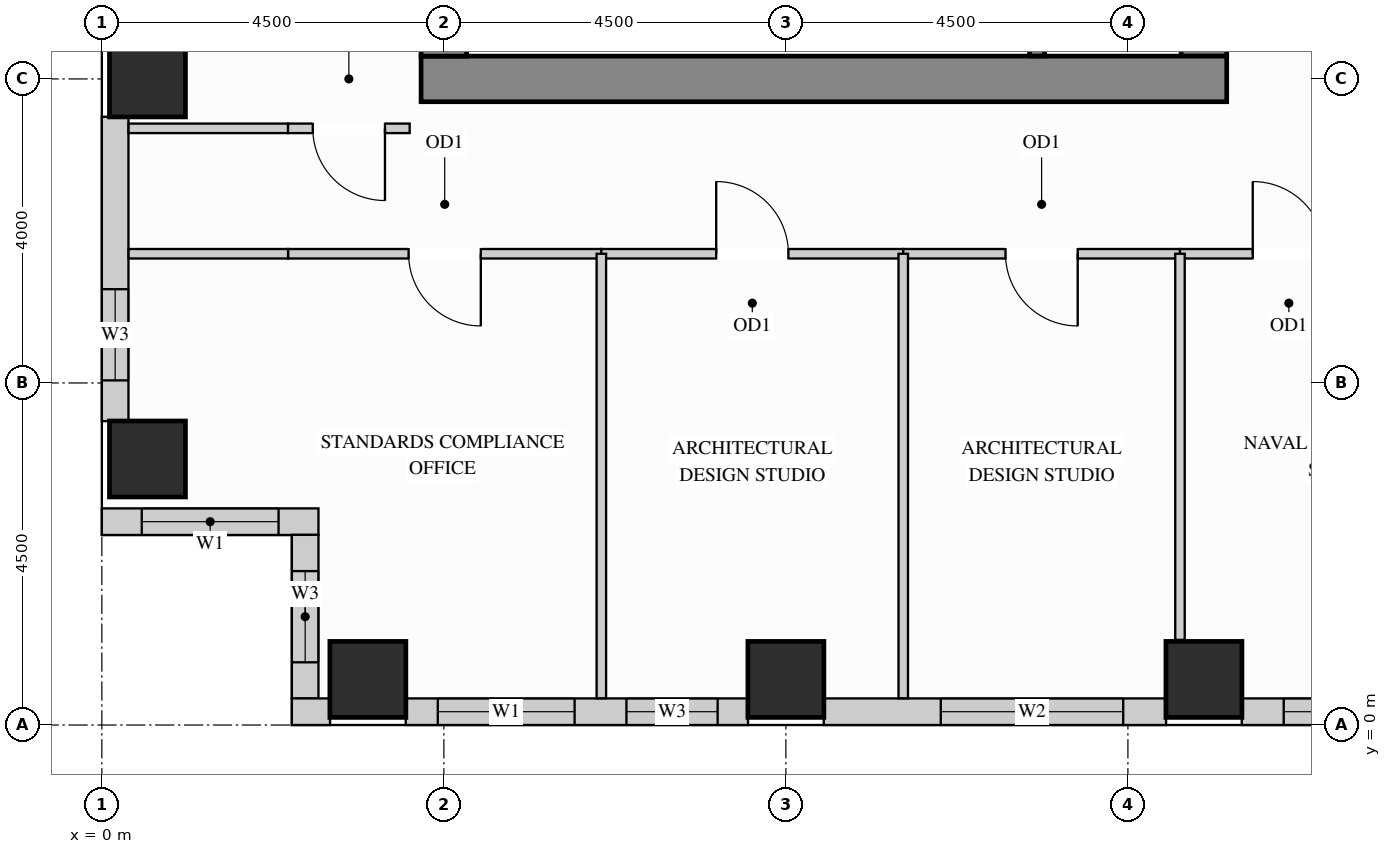
"""IFC4 building model, lengths in metres.
Left out: names, types, materials, properties, quantities, classifications, styles, units other than length and angle.
Written with IfcOpenShell. Run it as: python <this file> out.ifc"""

import sys

from ifc_helpers import new_model, si_unit, direction, frame, frame_2d, origin, origin_2d, place, context, subcontext, project, spatial, rectangle, extrude, source, transform, mapped, element, fill, save


model = new_model("IFC4")
c1 = context("Model", 3, precision=1e-05, world=origin(), true_north=direction((0.0, 1.0)))
c2 = subcontext(c1, "Body", "Model", "MODEL_VIEW")
j1 = project(units=[si_unit("LENGTHUNIT", "METRE"), si_unit("PLANEANGLEUNIT", "RADIAN")], contexts=[c1])
p1 = place(None, origin())
s1 = spatial("IfcSite", under=j1, at=p1, CompositionType="ELEMENT")
p2 = place(p1, origin())
s2 = spatial("IfcBuilding", under=s1, at=p2, CompositionType="ELEMENT")
p3 = place(p2, frame((0.0, 0.0, 150.3)))
s3 = spatial("IfcBuildingStorey", under=s2, at=p3, CompositionType="ELEMENT", Elevation=150.3)
m1 = source(origin(), c2, "Body", "SweptSolid", [
    extrude(rectangle(XDim=1.0, YDim=1.0, at=origin_2d()), origin(), (0.0, 0.0, 1.0), 3.4),
])
for number, where, z_axis, x_axis in (
    (1, (14.5, 0.6, 0.0), (0.0, 0.0, 1.0), (1.0, 0.0, 0.0)),
    (2, (3.5, 0.6, 0.0), (0.0, 0.0, 1.0), (1.0, 0.0, 0.0)),
    (3, (9.0, 0.6, 0.0), (0.0, 0.0, 1.0), (1.0, 0.0, 0.0)),
    (4, (0.6, 3.5, 0.0), (0.0, 0.0, 1.0), (1.0, 0.0, 0.0)),
    (5, (0.6, 8.5, 0.0), (0.0, 0.0, 1.0), (1.0, 0.0, 0.0)),
):
    element("IfcColumn", number, at=place(p3, frame(where, z_axis=z_axis, x_axis=x_axis)), inside=s3, PredefinedType="COLUMN", context=c2, shape_type="MappedRepresentation", body=[
        mapped(m1, transform((0.0, 0.0, 0.0), x_axis=(1.0, 0.0, 0.0), y_axis=(0.0, 1.0, 0.0), z_axis=(0.0, 0.0, 1.0))),
    ])
m2 = source(origin(), c2, "Body", "SweptSolid", [
    extrude(rectangle(XDim=10.02, YDim=0.6, at=frame_2d((5.01, 0.0))), origin(), (0.0, 0.0, 1.0), 3.4),
])
p4 = place(p3, frame((14.5, 8.8, 0.0), z_axis=(0.0, 0.0, 1.0), x_axis=(0.0, 1.0, 0.0)))
e6 = element("IfcWall", 6, at=p4, inside=s3, PredefinedType="SHEAR", context=c2, shape_type="MappedRepresentation", body=[
    mapped(m2, transform((0.0, 0.0, 0.0), x_axis=(1.0, 0.0, 0.0), y_axis=(0.0, 1.0, 0.0), z_axis=(0.0, 0.0, 1.0))),
])
m3 = source(origin(), c2, "Body", "SweptSolid", [
    extrude(rectangle(XDim=10.6, YDim=0.6, at=frame_2d((5.3, 0.0))), origin(), (0.0, 0.0, 1.0), 3.4),
])
p5 = place(p3, frame((4.2, 8.5, 0.0), z_axis=(0.0, 0.0, 1.0), x_axis=(1.0, 0.0, 0.0)))
e7 = element("IfcWall", 7, at=p5, inside=s3, PredefinedType="SHEAR", context=c2, shape_type="MappedRepresentation", body=[
    mapped(m3, transform((0.0, 0.0, 0.0), x_axis=(1.0, 0.0, 0.0), y_axis=(0.0, 1.0, 0.0), z_axis=(0.0, 0.0, 1.0))),
])
m4 = source(origin(), c2, "Body", "SweptSolid", [
    extrude(rectangle(XDim=20.4, YDim=0.6, at=frame_2d((10.2, 0.0))), origin(), (0.0, 0.0, 1.0), 3.4),
])
p6 = place(p3, frame((4.5, 8.8, 0.0), z_axis=(0.0, 0.0, 1.0), x_axis=(0.0, 1.0, 0.0)))
e8 = element("IfcWall", 8, at=p6, inside=s3, PredefinedType="SHEAR", context=c2, shape_type="MappedRepresentation", body=[
    mapped(m4, transform((0.0, 0.0, 0.0), x_axis=(1.0, 0.0, 0.0), y_axis=(0.0, 1.0, 0.0), z_axis=(0.0, 0.0, 1.0))),
])
p7 = place(p3, frame((0.175, 8.002, 0.0), z_axis=(0.0, 0.0, 1.0), x_axis=(0.0, -1.0, 0.0)))
e9 = element("IfcWall", 9, at=p7, inside=s3, PredefinedType="SOLIDWALL", context=c2, shape_type="SweptSolid", body=[
    extrude(rectangle(XDim=4.004, YDim=0.35, at=frame_2d((2.002, 0.0))), origin(), (0.0, 0.0, 1.0), 2.612),
])
p8 = place(p7, frame((2.268, 0.0, 0.78)))
e10 = element("IfcOpeningElement", 10, at=p8, cuts=e9, PredefinedType="OPENING", context=c2, shape_type="SweptSolid", body=[
    extrude(rectangle(XDim=1.2, YDim=1.652, at=frame_2d((0.6, 0.826))), frame((0.0, 0.185, 0.0), z_axis=(0.0, -1.0, 0.0), x_axis=(1.0, 0.0, 0.0)), (0.0, 0.0, 1.0), 0.37),
])
p9 = place(p3, frame((0.0, 2.675, 0.0), z_axis=(0.0, 0.0, 1.0), x_axis=(1.0, 0.0, 0.0)))
e11 = element("IfcWall", 11, at=p9, inside=s3, PredefinedType="SOLIDWALL", context=c2, shape_type="SweptSolid", body=[
    extrude(rectangle(XDim=2.85, YDim=0.35, at=frame_2d((1.425, 0.0))), origin(), (0.0, 0.0, 1.0), 3.385),
])
p10 = place(p9, frame((0.525, 0.0, 0.78)))
e12 = element("IfcOpeningElement", 12, at=p10, cuts=e11, PredefinedType="OPENING", context=c2, shape_type="SweptSolid", body=[
    extrude(rectangle(XDim=1.8, YDim=2.1, at=frame_2d((0.9, 1.05))), frame((0.0, 0.185, 0.0), z_axis=(0.0, -1.0, 0.0), x_axis=(1.0, 0.0, 0.0)), (0.0, 0.0, 1.0), 0.37),
])
p11 = place(p3, frame((2.675, 2.502, 0.0), z_axis=(0.0, 0.0, 1.0), x_axis=(0.0, -1.0, 0.0)))
e13 = element("IfcWall", 13, at=p11, inside=s3, PredefinedType="SOLIDWALL", context=c2, shape_type="SweptSolid", body=[
    extrude(rectangle(XDim=2.154, YDim=0.35, at=frame_2d((1.077, 0.0))), origin(), (0.0, 0.0, 1.0), 3.385),
])
p12 = place(p11, frame((0.477, 0.0, 0.78)))
e14 = element("IfcOpeningElement", 14, at=p12, cuts=e13, PredefinedType="OPENING", context=c2, shape_type="SweptSolid", body=[
    extrude(rectangle(XDim=1.2, YDim=2.1, at=frame_2d((0.6, 1.05))), frame((0.0, 0.185, 0.0), z_axis=(0.0, -1.0, 0.0), x_axis=(1.0, 0.0, 0.0)), (0.0, 0.0, 1.0), 0.37),
])
m5 = source(origin(), c2, "Body", "SweptSolid", [
    extrude(rectangle(XDim=0.502, YDim=0.35, at=frame_2d((0.251, 0.0))), origin(), (0.0, 0.0, 1.0), 3.385),
])
p13 = place(p3, frame((2.5, 0.175, 0.0), z_axis=(0.0, 0.0, 1.0), x_axis=(1.0, 0.0, 0.0)))
e15 = element("IfcWall", 15, at=p13, inside=s3, PredefinedType="SOLIDWALL", context=c2, shape_type="MappedRepresentation", body=[
    mapped(m5, transform((0.0, 0.0, 0.0), x_axis=(1.0, 0.0, 0.0), y_axis=(0.0, 1.0, 0.0), z_axis=(0.0, 0.0, 1.0))),
])
p14 = place(p3, frame((3.998, 0.175, 0.0), z_axis=(0.0, 0.0, 1.0), x_axis=(1.0, 0.0, 0.0)))
e16 = element("IfcWall", 16, at=p14, inside=s3, PredefinedType="SOLIDWALL", context=c2, shape_type="SweptSolid", body=[
    extrude(rectangle(XDim=4.504, YDim=0.35, at=frame_2d((2.252, 0.0))), origin(), (0.0, 0.0, 1.0), 2.612),
])
p15 = place(p14, frame((0.422, 0.0, 0.78)))
e17 = element("IfcOpeningElement", 17, at=p15, cuts=e16, PredefinedType="OPENING", context=c2, shape_type="SweptSolid", body=[
    extrude(rectangle(XDim=1.8, YDim=1.652, at=frame_2d((0.9, 0.826))), frame((0.0, 0.185, 0.0), z_axis=(0.0, -1.0, 0.0), x_axis=(1.0, 0.0, 0.0)), (0.0, 0.0, 1.0), 0.37),
])
p16 = place(p14, frame((2.904, 0.0, 0.78)))
e18 = element("IfcOpeningElement", 18, at=p16, cuts=e16, PredefinedType="OPENING", context=c2, shape_type="SweptSolid", body=[
    extrude(rectangle(XDim=1.2, YDim=1.652, at=frame_2d((0.6, 0.826))), frame((0.0, 0.185, 0.0), z_axis=(0.0, -1.0, 0.0), x_axis=(1.0, 0.0, 0.0)), (0.0, 0.0, 1.0), 0.37),
])
p17 = place(p3, frame((9.498, 0.175, 0.0), z_axis=(0.0, 0.0, 1.0), x_axis=(1.0, 0.0, 0.0)))
e19 = element("IfcWall", 19, at=p17, inside=s3, PredefinedType="SOLIDWALL", context=c2, shape_type="SweptSolid", body=[
    extrude(rectangle(XDim=4.504, YDim=0.35, at=frame_2d((2.252, 0.0))), origin(), (0.0, 0.0, 1.0), 2.612),
])
p18 = place(p17, frame((1.54, 0.0, 0.78)))
e20 = element("IfcOpeningElement", 20, at=p18, cuts=e19, PredefinedType="OPENING", context=c2, shape_type="SweptSolid", body=[
    extrude(rectangle(XDim=2.4, YDim=1.652, at=frame_2d((1.2, 0.826))), frame((0.0, 0.185, 0.0), z_axis=(0.0, -1.0, 0.0), x_axis=(1.0, 0.0, 0.0)), (0.0, 0.0, 1.0), 0.37),
])
p19 = place(p3, frame((14.998, 0.175, 0.0), z_axis=(0.0, 0.0, 1.0), x_axis=(1.0, 0.0, 0.0)))
e21 = element("IfcWall", 21, at=p19, inside=s3, PredefinedType="SOLIDWALL", context=c2, shape_type="SweptSolid", body=[
    extrude(rectangle(XDim=3.504, YDim=0.35, at=frame_2d((1.752, 0.0))), origin(), (0.0, 0.0, 1.0), 2.612),
])
p20 = place(p19, frame((0.552, 0.0, 0.78)))
e22 = element("IfcOpeningElement", 22, at=p20, cuts=e21, PredefinedType="OPENING", context=c2, shape_type="SweptSolid", body=[
    extrude(rectangle(XDim=2.4, YDim=1.652, at=frame_2d((1.2, 0.826))), frame((0.0, 0.185, 0.0), z_axis=(0.0, -1.0, 0.0), x_axis=(1.0, 0.0, 0.0)), (0.0, 0.0, 1.0), 0.37),
])
m6 = source(origin(), c2, "Body", "SweptSolid", [
    extrude(rectangle(XDim=2.098, YDim=0.125, at=frame_2d((1.049, 0.0))), origin(), (0.0, 0.0, 1.0), 3.385),
])
p21 = place(p3, frame((0.352, 7.85, 0.0), z_axis=(0.0, 0.0, 1.0), x_axis=(1.0, 0.0, 0.0)))
e23 = element("IfcWall", 23, at=p21, inside=s3, PredefinedType="PARTITIONING", context=c2, shape_type="MappedRepresentation", body=[
    mapped(m6, transform((0.0, 0.0, 0.0), x_axis=(1.0, 0.0, 0.0), y_axis=(0.0, 1.0, 0.0), z_axis=(0.0, 0.0, 1.0))),
])
p22 = place(p3, frame((2.45, 7.85, 0.0), z_axis=(0.0, 0.0, 1.0), x_axis=(1.0, 0.0, 0.0)))
e24 = element("IfcWall", 24, at=p22, inside=s3, PredefinedType="PARTITIONING", context=c2, shape_type="SweptSolid", body=[
    extrude(rectangle(XDim=1.6, YDim=0.125, at=frame_2d((0.8, 0.0))), origin(), (0.0, 0.0, 1.0), 3.385),
])
p23 = place(p22, frame((0.325, 0.0, 0.0)))
e25 = element("IfcOpeningElement", 25, at=p23, cuts=e24, PredefinedType="OPENING", context=c2, shape_type="SweptSolid", body=[
    extrude(rectangle(XDim=0.95, YDim=2.15, at=frame_2d((0.475, 1.075))), frame((0.0, 0.073, 0.0), z_axis=(0.0, -1.0, 0.0), x_axis=(1.0, 0.0, 0.0)), (0.0, 0.0, 1.0), 0.145),
])
p24 = place(p3, frame((2.45, 6.2, 0.0), z_axis=(0.0, 0.0, 1.0), x_axis=(1.0, 0.0, 0.0)))
e26 = element("IfcWall", 26, at=p24, inside=s3, PredefinedType="PARTITIONING", context=c2, shape_type="SweptSolid", body=[
    extrude(rectangle(XDim=4.122, YDim=0.125, at=frame_2d((2.061, 0.0))), origin(), (0.0, 0.0, 1.0), 2.848),
])
p25 = place(p24, frame((1.586, 0.0, 0.0)))
e27 = element("IfcOpeningElement", 27, at=p25, cuts=e26, PredefinedType="OPENING", context=c2, shape_type="SweptSolid", body=[
    extrude(rectangle(XDim=0.95, YDim=2.15, at=frame_2d((0.475, 1.075))), frame((0.0, 0.073, 0.0), z_axis=(0.0, -1.0, 0.0), x_axis=(1.0, 0.0, 0.0)), (0.0, 0.0, 1.0), 0.145),
])
p26 = place(p3, frame((6.572, 6.2, 0.0), z_axis=(0.0, 0.0, 1.0), x_axis=(1.0, 0.0, 0.0)))
e28 = element("IfcWall", 28, at=p26, inside=s3, PredefinedType="PARTITIONING", context=c2, shape_type="SweptSolid", body=[
    extrude(rectangle(XDim=3.972, YDim=0.125, at=frame_2d((1.986, 0.0))), origin(), (0.0, 0.0, 1.0), 2.848),
])
p27 = place(p26, frame((1.511, 0.0, 0.0)))
e29 = element("IfcOpeningElement", 29, at=p27, cuts=e28, PredefinedType="OPENING", context=c2, shape_type="SweptSolid", body=[
    extrude(rectangle(XDim=0.95, YDim=2.15, at=frame_2d((0.475, 1.075))), frame((0.0, 0.073, 0.0), z_axis=(0.0, -1.0, 0.0), x_axis=(1.0, 0.0, 0.0)), (0.0, 0.0, 1.0), 0.145),
])
p28 = place(p3, frame((10.544, 6.2, 0.0), z_axis=(0.0, 0.0, 1.0), x_axis=(1.0, 0.0, 0.0)))
e30 = element("IfcWall", 30, at=p28, inside=s3, PredefinedType="PARTITIONING", context=c2, shape_type="SweptSolid", body=[
    extrude(rectangle(XDim=3.641, YDim=0.125, at=frame_2d((1.821, 0.0))), origin(), (0.0, 0.0, 1.0), 2.848),
])
p29 = place(p28, frame((1.345, 0.0, 0.0)))
e31 = element("IfcOpeningElement", 31, at=p29, cuts=e30, PredefinedType="OPENING", context=c2, shape_type="SweptSolid", body=[
    extrude(rectangle(XDim=0.95, YDim=2.15, at=frame_2d((0.475, 1.075))), frame((0.0, 0.073, 0.0), z_axis=(0.0, -1.0, 0.0), x_axis=(1.0, 0.0, 0.0)), (0.0, 0.0, 1.0), 0.145),
])
p30 = place(p3, frame((14.185, 6.2, 0.0), z_axis=(0.0, 0.0, 1.0), x_axis=(1.0, 0.0, 0.0)))
e32 = element("IfcWall", 32, at=p30, inside=s3, PredefinedType="PARTITIONING", context=c2, shape_type="SweptSolid", body=[
    extrude(rectangle(XDim=2.865, YDim=0.125, at=frame_2d((1.433, 0.0))), origin(), (0.0, 0.0, 1.0), 2.848),
])
p31 = place(p30, frame((0.958, 0.0, 0.0)))
e33 = element("IfcOpeningElement", 33, at=p31, cuts=e32, PredefinedType="OPENING", context=c2, shape_type="SweptSolid", body=[
    extrude(rectangle(XDim=0.95, YDim=2.15, at=frame_2d((0.475, 1.075))), frame((0.0, 0.073, 0.0), z_axis=(0.0, -1.0, 0.0), x_axis=(1.0, 0.0, 0.0)), (0.0, 0.0, 1.0), 0.145),
])
m7 = source(origin(), c2, "Body", "SweptSolid", [
    extrude(rectangle(XDim=2.098, YDim=0.125, at=frame_2d((1.049, 0.0))), origin(), (0.0, 0.0, 1.0), 2.848),
])
p32 = place(p3, frame((0.352, 6.2, 0.0), z_axis=(0.0, 0.0, 1.0), x_axis=(1.0, 0.0, 0.0)))
e34 = element("IfcWall", 34, at=p32, inside=s3, PredefinedType="PARTITIONING", context=c2, shape_type="MappedRepresentation", body=[
    mapped(m7, transform((0.0, 0.0, 0.0), x_axis=(1.0, 0.0, 0.0), y_axis=(0.0, 1.0, 0.0), z_axis=(0.0, 0.0, 1.0))),
])
m8 = source(origin(), c2, "Body", "SweptSolid", [
    extrude(rectangle(XDim=5.848, YDim=0.125, at=frame_2d((2.924, 0.0))), origin(), (0.0, 0.0, 1.0), 3.385),
])
for number, where, z_axis, x_axis in (
    (35, (6.572, 0.352, 0.0), (0.0, 0.0, 1.0), (0.0, 1.0, 0.0)),
    (36, (10.544, 0.352, 0.0), (0.0, 0.0, 1.0), (0.0, 1.0, 0.0)),
):
    element("IfcWall", number, at=place(p3, frame(where, z_axis=z_axis, x_axis=x_axis)), inside=s3, PredefinedType="PARTITIONING", context=c2, shape_type="MappedRepresentation", body=[
        mapped(m8, transform((0.0, 0.0, 0.0), x_axis=(1.0, 0.0, 0.0), y_axis=(0.0, 1.0, 0.0), z_axis=(0.0, 0.0, 1.0))),
    ])
m9 = source(origin(), c2, "Body", "SweptSolid", [
    extrude(rectangle(XDim=5.08, YDim=0.125, at=frame_2d((2.54, 0.0))), origin(), (0.0, 0.0, 1.0), 3.385),
])
p33 = place(p3, frame((14.185, 1.12, 0.0), z_axis=(0.0, 0.0, 1.0), x_axis=(0.0, 1.0, 0.0)))
e37 = element("IfcWall", 37, at=p33, inside=s3, PredefinedType="PARTITIONING", context=c2, shape_type="MappedRepresentation", body=[
    mapped(m9, transform((0.0, 0.0, 0.0), x_axis=(1.0, 0.0, 0.0), y_axis=(0.0, 1.0, 0.0), z_axis=(0.0, 0.0, 1.0))),
])
m10 = source(origin(), c2, "Body", "SweptSolid", [
    extrude(rectangle(XDim=3.753, YDim=0.2, at=frame_2d((1.876, 0.0))), origin(), (0.0, 0.0, 1.0), 3.4),
])
p34 = place(p3, frame((12.305, 8.802, 0.0), z_axis=(0.0, 0.0, 1.0), x_axis=(0.0, 1.0, 0.0)))
e38 = element("IfcWall", 38, at=p34, inside=s3, PredefinedType="SHEAR", context=c2, shape_type="MappedRepresentation", body=[
    mapped(m10, transform((0.0, 0.0, 0.0), x_axis=(1.0, 0.0, 0.0), y_axis=(0.0, 1.0, 0.0), z_axis=(0.0, 0.0, 1.0))),
])
m11 = source(origin(), c2, "Body", "SweptSolid", [
    extrude(rectangle(XDim=0.95, YDim=2.15, at=frame_2d((0.475, 1.075))), frame((0.0, 0.025, 0.0), z_axis=(0.0, -1.0, 0.0), x_axis=(1.0, 0.0, 0.0)), (0.0, 0.0, 1.0), 0.05),
])
p35 = place(p25, origin())
e39 = element("IfcDoor", 39, at=p35, inside=s3, OperationType="SINGLE_SWING_RIGHT", PredefinedType="DOOR", context=c2, shape_type="MappedRepresentation", body=[
    mapped(m11, transform((0.0, 0.0, 0.0), x_axis=(1.0, 0.0, 0.0), y_axis=(0.0, 1.0, 0.0), z_axis=(0.0, 0.0, 1.0))),
])
fill(e27, e39)
p36 = place(p27, origin())
e40 = element("IfcDoor", 40, at=p36, inside=s3, OperationType="SINGLE_SWING_LEFT", PredefinedType="DOOR", context=c2, shape_type="MappedRepresentation", body=[
    mapped(m11, transform((0.0, 0.0, 0.0), x_axis=(1.0, 0.0, 0.0), y_axis=(0.0, 1.0, 0.0), z_axis=(0.0, 0.0, 1.0))),
])
fill(e29, e40)
p37 = place(p29, origin())
e41 = element("IfcDoor", 41, at=p37, inside=s3, OperationType="SINGLE_SWING_RIGHT", PredefinedType="DOOR", context=c2, shape_type="MappedRepresentation", body=[
    mapped(m11, transform((0.0, 0.0, 0.0), x_axis=(1.0, 0.0, 0.0), y_axis=(0.0, 1.0, 0.0), z_axis=(0.0, 0.0, 1.0))),
])
fill(e31, e41)
p38 = place(p31, origin())
e42 = element("IfcDoor", 42, at=p38, inside=s3, OperationType="SINGLE_SWING_LEFT", PredefinedType="DOOR", context=c2, shape_type="MappedRepresentation", body=[
    mapped(m11, transform((0.0, 0.0, 0.0), x_axis=(1.0, 0.0, 0.0), y_axis=(0.0, 1.0, 0.0), z_axis=(0.0, 0.0, 1.0))),
])
fill(e33, e42)
p39 = place(p23, origin())
e43 = element("IfcDoor", 43, at=p39, inside=s3, OperationType="SINGLE_SWING_RIGHT", PredefinedType="DOOR", context=c2, shape_type="MappedRepresentation", body=[
    mapped(m11, transform((0.0, 0.0, 0.0), x_axis=(1.0, 0.0, 0.0), y_axis=(0.0, 1.0, 0.0), z_axis=(0.0, 0.0, 1.0))),
])
fill(e25, e43)
m12 = source(origin(), c2, "Body", "SweptSolid", [
    extrude(rectangle(XDim=1.8, YDim=2.1, at=frame_2d((0.9, 1.05))), frame((0.0, 0.03, 0.0), z_axis=(0.0, -1.0, 0.0), x_axis=(1.0, 0.0, 0.0)), (0.0, 0.0, 1.0), 0.06),
])
p40 = place(p10, origin())
e44 = element("IfcWindow", 44, at=p40, inside=s3, PartitioningType="SINGLE_PANEL", PredefinedType="WINDOW", context=c2, shape_type="MappedRepresentation", body=[
    mapped(m12, transform((0.0, 0.0, 0.0), x_axis=(1.0, 0.0, 0.0), y_axis=(0.0, 1.0, 0.0), z_axis=(0.0, 0.0, 1.0))),
])
fill(e12, e44)
m13 = source(origin(), c2, "Body", "SweptSolid", [
    extrude(rectangle(XDim=1.8, YDim=1.652, at=frame_2d((0.9, 0.826))), frame((0.0, 0.03, 0.0), z_axis=(0.0, -1.0, 0.0), x_axis=(1.0, 0.0, 0.0)), (0.0, 0.0, 1.0), 0.06),
])
p41 = place(p15, origin())
e45 = element("IfcWindow", 45, at=p41, inside=s3, PartitioningType="SINGLE_PANEL", PredefinedType="WINDOW", context=c2, shape_type="MappedRepresentation", body=[
    mapped(m13, transform((0.0, 0.0, 0.0), x_axis=(1.0, 0.0, 0.0), y_axis=(0.0, 1.0, 0.0), z_axis=(0.0, 0.0, 1.0))),
])
fill(e17, e45)
m14 = source(origin(), c2, "Body", "SweptSolid", [
    extrude(rectangle(XDim=2.4, YDim=1.652, at=frame_2d((1.2, 0.826))), frame((0.0, 0.03, 0.0), z_axis=(0.0, -1.0, 0.0), x_axis=(1.0, 0.0, 0.0)), (0.0, 0.0, 1.0), 0.06),
])
p42 = place(p18, origin())
e46 = element("IfcWindow", 46, at=p42, inside=s3, PartitioningType="SINGLE_PANEL", PredefinedType="WINDOW", context=c2, shape_type="MappedRepresentation", body=[
    mapped(m14, transform((0.0, 0.0, 0.0), x_axis=(1.0, 0.0, 0.0), y_axis=(0.0, 1.0, 0.0), z_axis=(0.0, 0.0, 1.0))),
])
fill(e20, e46)
p43 = place(p20, origin())
e47 = element("IfcWindow", 47, at=p43, inside=s3, PartitioningType="SINGLE_PANEL", PredefinedType="WINDOW", context=c2, shape_type="MappedRepresentation", body=[
    mapped(m14, transform((0.0, 0.0, 0.0), x_axis=(1.0, 0.0, 0.0), y_axis=(0.0, 1.0, 0.0), z_axis=(0.0, 0.0, 1.0))),
])
fill(e22, e47)
m15 = source(origin(), c2, "Body", "SweptSolid", [
    extrude(rectangle(XDim=1.2, YDim=1.652, at=frame_2d((0.6, 0.826))), frame((0.0, 0.03, 0.0), z_axis=(0.0, -1.0, 0.0), x_axis=(1.0, 0.0, 0.0)), (0.0, 0.0, 1.0), 0.06),
])
p44 = place(p8, origin())
e48 = element("IfcWindow", 48, at=p44, inside=s3, PartitioningType="SINGLE_PANEL", PredefinedType="WINDOW", context=c2, shape_type="MappedRepresentation", body=[
    mapped(m15, transform((0.0, 0.0, 0.0), x_axis=(1.0, 0.0, 0.0), y_axis=(0.0, 1.0, 0.0), z_axis=(0.0, 0.0, 1.0))),
])
fill(e10, e48)
m16 = source(origin(), c2, "Body", "SweptSolid", [
    extrude(rectangle(XDim=1.2, YDim=2.1, at=frame_2d((0.6, 1.05))), frame((0.0, 0.03, 0.0), z_axis=(0.0, -1.0, 0.0), x_axis=(1.0, 0.0, 0.0)), (0.0, 0.0, 1.0), 0.06),
])
p45 = place(p12, origin())
e49 = element("IfcWindow", 49, at=p45, inside=s3, PartitioningType="SINGLE_PANEL", PredefinedType="WINDOW", context=c2, shape_type="MappedRepresentation", body=[
    mapped(m16, transform((0.0, 0.0, 0.0), x_axis=(1.0, 0.0, 0.0), y_axis=(0.0, 1.0, 0.0), z_axis=(0.0, 0.0, 1.0))),
])
fill(e14, e49)
p46 = place(p16, origin())
e50 = element("IfcWindow", 50, at=p46, inside=s3, PartitioningType="SINGLE_PANEL", PredefinedType="WINDOW", context=c2, shape_type="MappedRepresentation", body=[
    mapped(m15, transform((0.0, 0.0, 0.0), x_axis=(1.0, 0.0, 0.0), y_axis=(0.0, 1.0, 0.0), z_axis=(0.0, 0.0, 1.0))),
])
fill(e18, e50)
save(model, sys.argv[1])
